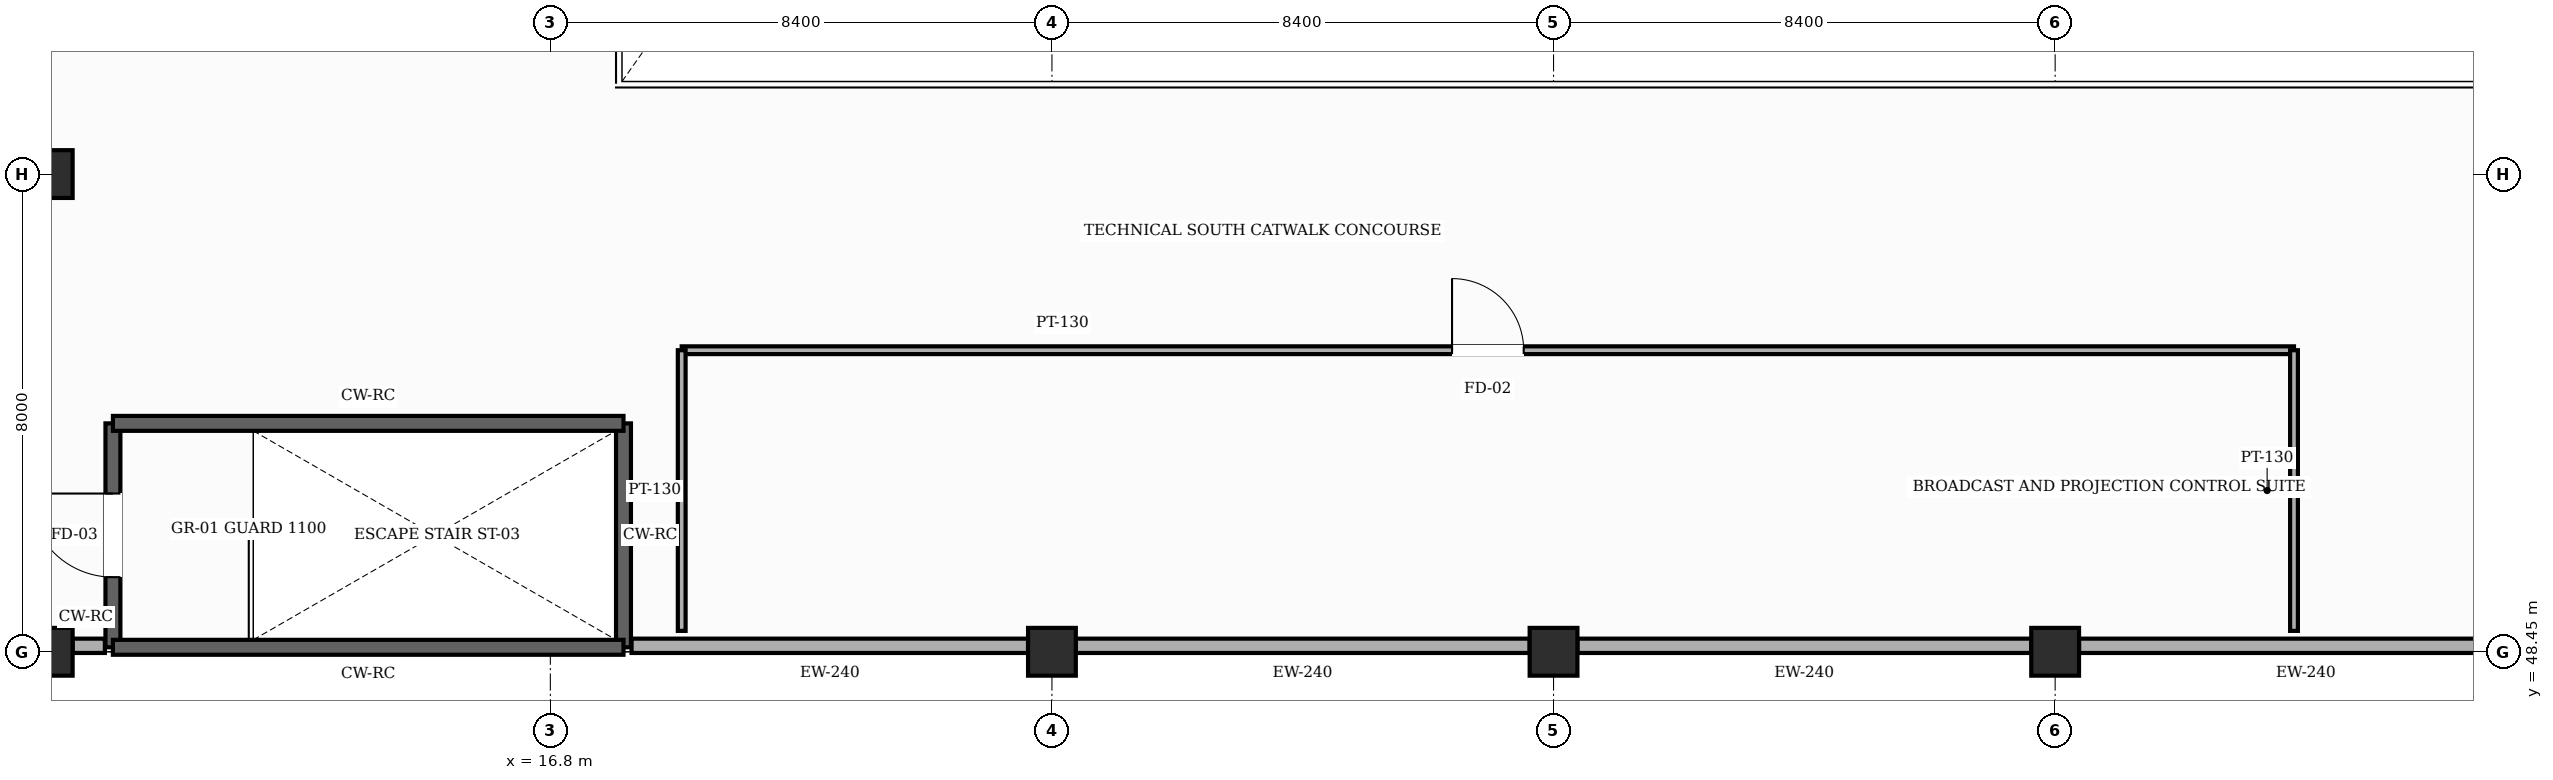
"""IFC4 building model, lengths in metres.
Left out: names, types, materials, properties, quantities, classifications, styles, units other than length and angle.
Written with IfcOpenShell. Run it as: python <this file> out.ifc"""

import sys

from ifc_helpers import new_model, si_unit, direction, frame, frame_2d, origin, origin_2d, place, context, subcontext, project, spatial, rectangle, hollow_rectangle, extrude, element, fill, save


model = new_model("IFC4")
c1 = context("Model", 3, precision=1e-05, world=origin(), true_north=direction((0.0, 1.0)))
c2 = subcontext(c1, "Body", "Model", "MODEL_VIEW")
j1 = project(units=[si_unit("LENGTHUNIT", "METRE"), si_unit("PLANEANGLEUNIT", "RADIAN")], contexts=[c1])
p1 = place(None, origin())
s1 = spatial("IfcSite", under=j1, at=p1, CompositionType="ELEMENT")
p2 = place(p1, origin())
s2 = spatial("IfcBuilding", under=s1, at=p2, CompositionType="ELEMENT")
p3 = place(p2, frame((0.0, 0.0, 15.0)))
s3 = spatial("IfcBuildingStorey", under=s2, at=p3, CompositionType="ELEMENT", Elevation=15.0)
for number, where, z_axis, x_axis in (
    (1, (8.4, 48.45, 0.0), (0.0, 0.0, 1.0), (1.0, 0.0, 0.0)),
    (2, (8.4, 56.45, 0.0), (0.0, 0.0, 1.0), (1.0, 0.0, 0.0)),
    (3, (25.2, 48.45, 0.0), (0.0, 0.0, 1.0), (1.0, 0.0, 0.0)),
    (4, (33.6, 48.45, 0.0), (0.0, 0.0, 1.0), (1.0, 0.0, 0.0)),
    (5, (42.0, 48.45, 0.0), (0.0, 0.0, 1.0), (1.0, 0.0, 0.0)),
):
    element("IfcColumn", number, at=place(p3, frame(where, z_axis=z_axis, x_axis=x_axis)), inside=s3, PredefinedType="COLUMN", context=c2, shape_type="SweptSolid", body=[
        extrude(hollow_rectangle(XDim=0.8, YDim=0.8, WallThickness=0.032, InnerFilletRadius=0.032, OuterFilletRadius=0.064, at=origin_2d()), origin(), (0.0, 0.0, 1.0), 4.8),
    ])
p4 = place(p3, frame((9.34, 48.55, 0.0), z_axis=(0.0, 0.0, 1.0), x_axis=(-1.0, 0.0, 0.0)))
e6 = element("IfcWall", 6, at=p4, inside=s3, PredefinedType="SOLIDWALL", context=c2, shape_type="SweptSolid", body=[
    extrude(rectangle(XDim=0.54, YDim=0.24, at=frame_2d((0.27, 0.0))), origin(), (0.0, 0.0, 1.0), 3.535),
])
p5 = place(p3, frame((24.8, 48.55, 0.0), z_axis=(0.0, 0.0, 1.0), x_axis=(-1.0, 0.0, 0.0)))
e7 = element("IfcWall", 7, at=p5, inside=s3, PredefinedType="SOLIDWALL", context=c2, shape_type="SweptSolid", body=[
    extrude(rectangle(XDim=6.64, YDim=0.24, at=frame_2d((3.32, 0.0))), origin(), (0.0, 0.0, 1.0), 3.535),
])
p6 = place(p3, frame((33.2, 48.55, 0.0), z_axis=(0.0, 0.0, 1.0), x_axis=(-1.0, 0.0, 0.0)))
e8 = element("IfcWall", 8, at=p6, inside=s3, PredefinedType="SOLIDWALL", context=c2, shape_type="SweptSolid", body=[
    extrude(rectangle(XDim=7.6, YDim=0.24, at=frame_2d((3.8, 0.0))), origin(), (0.0, 0.0, 1.0), 3.935),
])
for number, where, z_axis, x_axis in (
    (9, (41.6, 48.55, 0.0), (0.0, 0.0, 1.0), (-1.0, 0.0, 0.0)),
    (10, (50.0, 48.55, 0.0), (0.0, 0.0, 1.0), (-1.0, 0.0, 0.0)),
):
    element("IfcWall", number, at=place(p3, frame(where, z_axis=z_axis, x_axis=x_axis)), inside=s3, PredefinedType="SOLIDWALL", context=c2, shape_type="SweptSolid", body=[
        extrude(rectangle(XDim=7.6, YDim=0.24, at=frame_2d((3.8, 0.0))), origin(), (0.0, 0.0, 1.0), 3.935),
    ])
p7 = place(p3, frame((9.475, 48.525, 0.0), z_axis=(0.0, 0.0, 1.0), x_axis=(0.0, 1.0, 0.0)))
e11 = element("IfcWall", 11, at=p7, inside=s3, PredefinedType="SHEAR", context=c2, shape_type="SweptSolid", body=[
    extrude(rectangle(XDim=3.75, YDim=0.25, at=frame_2d((1.875, 0.0))), origin(), (0.0, 0.0, 1.0), 4.56),
])
p8 = place(p7, frame((1.175, 0.0, 0.0)))
e12 = element("IfcOpeningElement", 12, at=p8, cuts=e11, PredefinedType="OPENING", context=c2, shape_type="SweptSolid", body=[
    extrude(rectangle(XDim=1.4, YDim=2.25, at=frame_2d((0.7, 1.125))), frame((0.0, 0.135, 0.0), z_axis=(0.0, -1.0, 0.0), x_axis=(1.0, 0.0, 0.0)), (0.0, 0.0, 1.0), 0.27),
])
p9 = place(p3, frame((18.025, 52.275, 0.0), z_axis=(0.0, 0.0, 1.0), x_axis=(0.0, -1.0, 0.0)))
e13 = element("IfcWall", 13, at=p9, inside=s3, PredefinedType="SHEAR", context=c2, shape_type="SweptSolid", body=[
    extrude(rectangle(XDim=3.75, YDim=0.25, at=frame_2d((1.875, 0.0))), origin(), (0.0, 0.0, 1.0), 4.56),
])
for number, where, z_axis, x_axis in (
    (14, (18.025, 48.525, 0.0), (0.0, 0.0, 1.0), (-1.0, 0.0, 0.0)),
    (15, (9.475, 52.275, 0.0), (0.0, 0.0, 1.0), (1.0, 0.0, 0.0)),
):
    element("IfcWall", number, at=place(p3, frame(where, z_axis=z_axis, x_axis=x_axis)), inside=s3, PredefinedType="SHEAR", context=c2, shape_type="SweptSolid", body=[
        extrude(rectangle(XDim=8.55, YDim=0.25, at=frame_2d((4.275, 0.0))), origin(), (0.0, 0.0, 1.0), 4.56),
    ])
p10 = place(p3, frame((19.0, 53.5, 0.0), z_axis=(0.0, 0.0, 1.0), x_axis=(1.0, 0.0, 0.0)))
e16 = element("IfcWall", 16, at=p10, inside=s3, PredefinedType="PARTITIONING", context=c2, shape_type="SweptSolid", body=[
    extrude(rectangle(XDim=27.0, YDim=0.13, at=frame_2d((13.5, 0.0))), origin(), (0.0, 0.0, 1.0), 4.545),
])
p11 = place(p10, frame((12.9, 0.0, 0.0)))
e17 = element("IfcOpeningElement", 17, at=p11, cuts=e16, PredefinedType="OPENING", context=c2, shape_type="SweptSolid", body=[
    extrude(rectangle(XDim=1.2, YDim=2.2, at=frame_2d((0.6, 1.1))), frame((0.0, 0.075, 0.0), z_axis=(0.0, -1.0, 0.0), x_axis=(1.0, 0.0, 0.0)), (0.0, 0.0, 1.0), 0.15),
])
for number, where, z_axis, x_axis in (
    (18, (19.0, 48.8, 0.0), (0.0, 0.0, 1.0), (0.0, 1.0, 0.0)),
    (19, (46.0, 48.8, 0.0), (0.0, 0.0, 1.0), (0.0, 1.0, 0.0)),
):
    element("IfcWall", number, at=place(p3, frame(where, z_axis=z_axis, x_axis=x_axis)), inside=s3, PredefinedType="PARTITIONING", context=c2, shape_type="SweptSolid", body=[
        extrude(rectangle(XDim=4.7, YDim=0.13, at=frame_2d((2.35, 0.0))), origin(), (0.0, 0.0, 1.0), 4.545),
    ])
p12 = place(p8, origin())
e20 = element("IfcDoor", 20, at=p12, inside=s3, OperationType="SINGLE_SWING_RIGHT", PredefinedType="DOOR", context=c2, shape_type="SweptSolid", body=[
    extrude(rectangle(XDim=1.4, YDim=2.25, at=frame_2d((0.7, 1.125))), frame((0.0, 0.025, 0.0), z_axis=(0.0, -1.0, 0.0), x_axis=(1.0, 0.0, 0.0)), (0.0, 0.0, 1.0), 0.05),
])
fill(e12, e20)
p13 = place(p11, origin())
e21 = element("IfcDoor", 21, at=p13, inside=s3, OperationType="SINGLE_SWING_LEFT", PredefinedType="DOOR", context=c2, shape_type="SweptSolid", body=[
    extrude(rectangle(XDim=1.2, YDim=2.2, at=frame_2d((0.6, 1.1))), frame((0.0, 0.025, 0.0), z_axis=(0.0, -1.0, 0.0), x_axis=(1.0, 0.0, 0.0)), (0.0, 0.0, 1.0), 0.05),
])
fill(e17, e21)
save(model, sys.argv[1])
